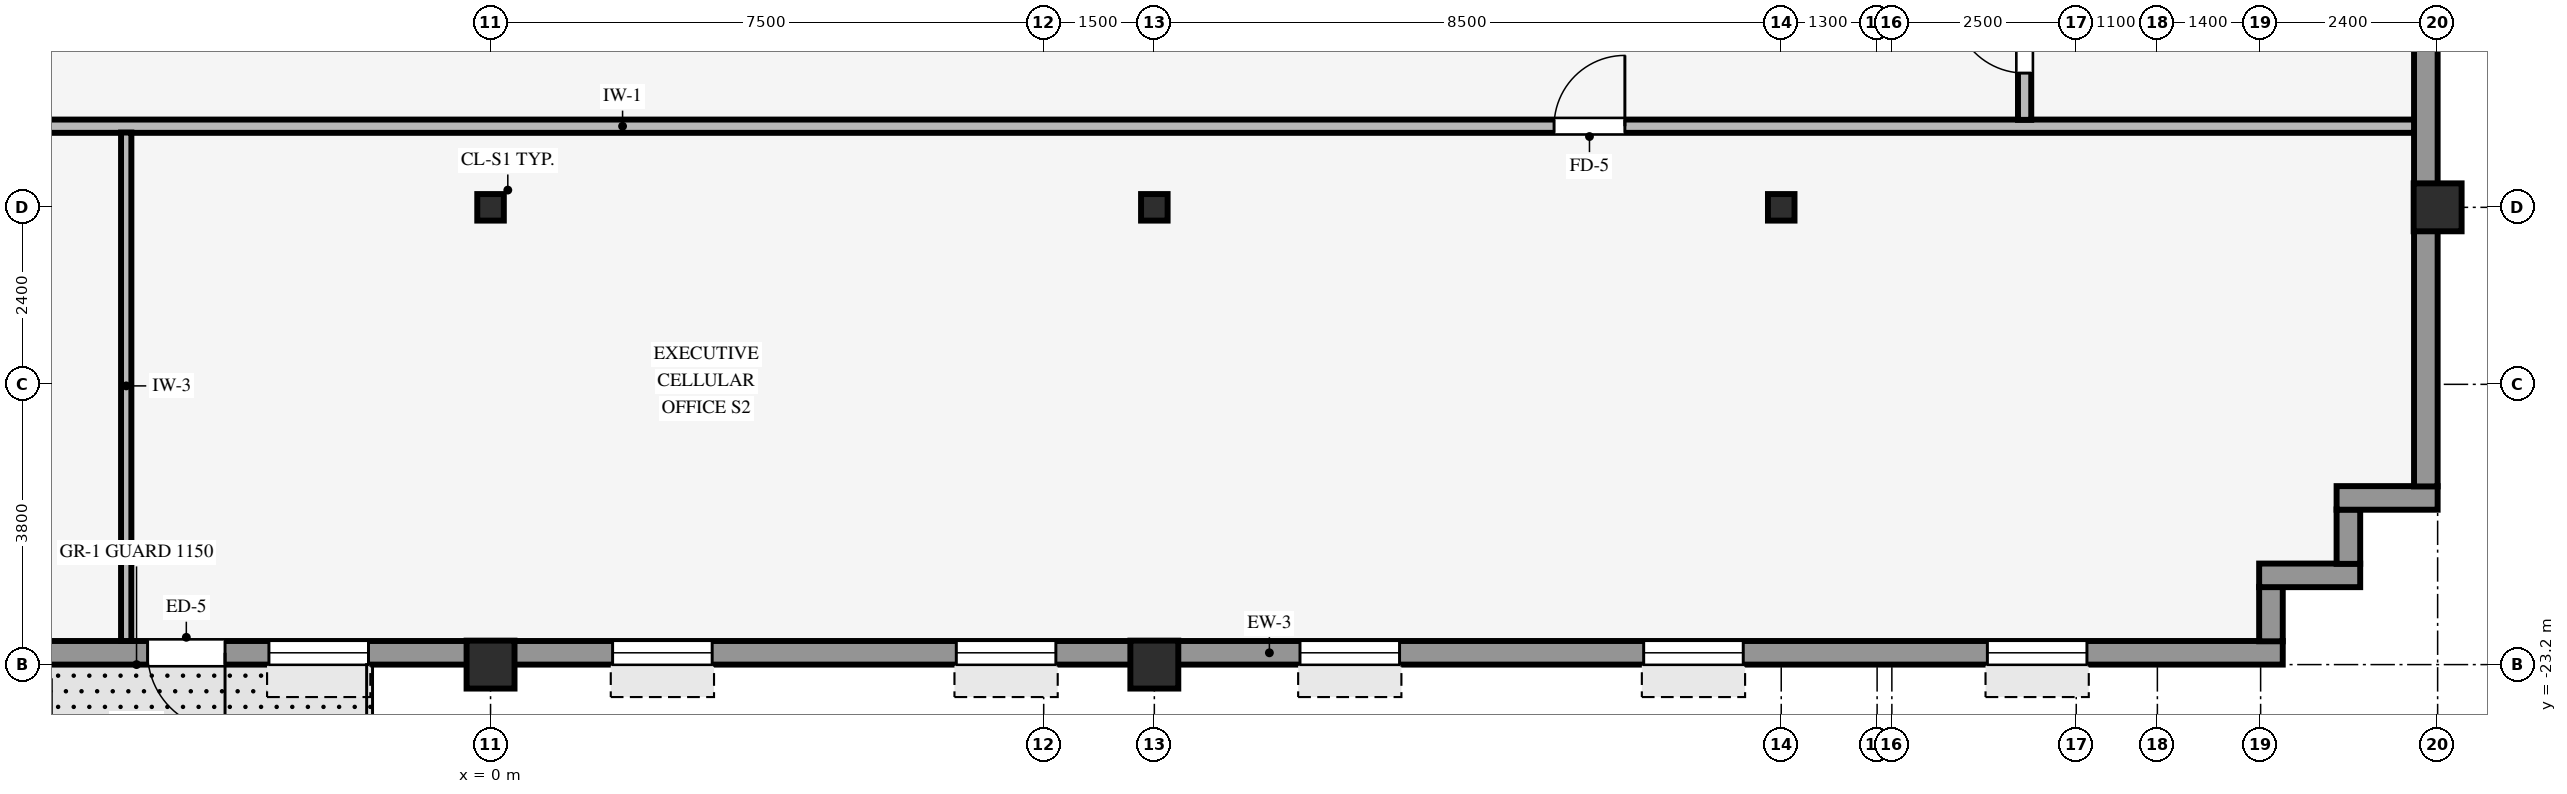
"""IFC4 building model, lengths in metres.
Left out: names, types, materials, properties, quantities, classifications, styles, units other than length and angle.
Written with IfcOpenShell. Run it as: python <this file> out.ifc"""

import sys

from ifc_helpers import new_model, si_unit, direction, frame, frame_2d, origin, origin_2d, place, context, subcontext, project, spatial, rectangle, hollow_rectangle, i_section, extrude, source, transform, mapped, element, fill, save


model = new_model("IFC4")
c1 = context("Model", 3, precision=1e-05, world=origin(), true_north=direction((0.0, 1.0)))
c2 = subcontext(c1, "Body", "Model", "MODEL_VIEW")
j1 = project(units=[si_unit("LENGTHUNIT", "METRE"), si_unit("PLANEANGLEUNIT", "RADIAN")], contexts=[c1])
p1 = place(None, origin())
s1 = spatial("IfcSite", under=j1, at=p1, CompositionType="ELEMENT")
p2 = place(p1, origin())
s2 = spatial("IfcBuilding", under=s1, at=p2, CompositionType="ELEMENT")
p3 = place(p2, frame((0.0, 0.0, 127.5)))
s3 = spatial("IfcBuildingStorey", under=s2, at=p3, CompositionType="ELEMENT", Elevation=127.5)
for number, where, z_axis, x_axis in (
    (1, (26.4, -17.0, 0.0), (0.0, 0.0, 1.0), (1.0, 0.0, 0.0)),
    (2, (0.0, -23.2, 0.0), (0.0, 0.0, 1.0), (1.0, 0.0, 0.0)),
    (3, (9.0, -23.2, 0.0), (0.0, 0.0, 1.0), (1.0, 0.0, 0.0)),
):
    element("IfcColumn", number, at=place(p3, frame(where, z_axis=z_axis, x_axis=x_axis)), inside=s3, PredefinedType="COLUMN", context=c2, shape_type="SweptSolid", body=[
        extrude(hollow_rectangle(XDim=0.65, YDim=0.65, WallThickness=0.04, InnerFilletRadius=0.04, OuterFilletRadius=0.08, at=origin_2d()), origin(), (0.0, 0.0, 1.0), 3.37),
    ])
for number, where, z_axis, x_axis in (
    (4, (0.0, -17.0, 0.0), (0.0, 0.0, 1.0), (1.0, 0.0, 0.0)),
    (5, (9.0, -17.0, 0.0), (0.0, 0.0, 1.0), (1.0, 0.0, 0.0)),
    (6, (17.5, -17.0, 0.0), (0.0, 0.0, 1.0), (1.0, 0.0, 0.0)),
):
    element("IfcColumn", number, at=place(p3, frame(where, z_axis=z_axis, x_axis=x_axis)), inside=s3, PredefinedType="COLUMN", context=c2, shape_type="SweptSolid", body=[
        extrude(i_section(OverallWidth=0.36, OverallDepth=0.36, WebThickness=0.021, FlangeThickness=0.021, FilletRadius=0.018, at=origin_2d()), origin(), (0.0, 0.0, 1.0), 3.37),
    ])
p4 = place(p3, frame((-24.3, -23.04, 0.0), z_axis=(0.0, 0.0, 1.0), x_axis=(1.0, 0.0, 0.0)))
e7 = element("IfcWall", 7, at=p4, inside=s3, PredefinedType="STANDARD", context=c2, shape_type="SweptSolid", body=[
    extrude(rectangle(XDim=48.6, YDim=0.32, at=frame_2d((24.3, 0.0))), origin(), (0.0, 0.0, 1.0), 2.705),
])
p5 = place(p4, frame((20.7, 0.0, 0.0), z_axis=(0.0, 0.0, 1.0), x_axis=(-1.0, 0.0, 0.0)))
e8 = element("IfcOpeningElement", 8, at=p5, cuts=e7, PredefinedType="OPENING", context=c2, shape_type="SweptSolid", body=[
    extrude(rectangle(XDim=1.05, YDim=2.1, at=frame_2d((0.525, 1.05))), frame((0.0, 0.17, 0.0), z_axis=(0.0, -1.0, 0.0), x_axis=(1.0, 0.0, 0.0)), (0.0, 0.0, 1.0), 0.34),
])
p6 = place(p4, frame((2.655, 0.0, 0.8)))
e9 = element("IfcOpeningElement", 9, at=p6, cuts=e7, PredefinedType="OPENING", context=c2, shape_type="SweptSolid", body=[
    extrude(rectangle(XDim=1.35, YDim=1.56, at=frame_2d((0.675, 0.78))), frame((0.0, 0.17, 0.0), z_axis=(0.0, -1.0, 0.0), x_axis=(1.0, 0.0, 0.0)), (0.0, 0.0, 1.0), 0.34),
])
p7 = place(p4, frame((7.315, 0.0, 0.8)))
e10 = element("IfcOpeningElement", 10, at=p7, cuts=e7, PredefinedType="OPENING", context=c2, shape_type="SweptSolid", body=[
    extrude(rectangle(XDim=1.35, YDim=1.56, at=frame_2d((0.675, 0.78))), frame((0.0, 0.17, 0.0), z_axis=(0.0, -1.0, 0.0), x_axis=(1.0, 0.0, 0.0)), (0.0, 0.0, 1.0), 0.34),
])
p8 = place(p4, frame((11.975, 0.0, 0.8)))
e11 = element("IfcOpeningElement", 11, at=p8, cuts=e7, PredefinedType="OPENING", context=c2, shape_type="SweptSolid", body=[
    extrude(rectangle(XDim=1.35, YDim=1.56, at=frame_2d((0.675, 0.78))), frame((0.0, 0.17, 0.0), z_axis=(0.0, -1.0, 0.0), x_axis=(1.0, 0.0, 0.0)), (0.0, 0.0, 1.0), 0.34),
])
p9 = place(p4, frame((16.635, 0.0, 0.8)))
e12 = element("IfcOpeningElement", 12, at=p9, cuts=e7, PredefinedType="OPENING", context=c2, shape_type="SweptSolid", body=[
    extrude(rectangle(XDim=1.35, YDim=1.56, at=frame_2d((0.675, 0.78))), frame((0.0, 0.17, 0.0), z_axis=(0.0, -1.0, 0.0), x_axis=(1.0, 0.0, 0.0)), (0.0, 0.0, 1.0), 0.34),
])
p10 = place(p4, frame((21.295, 0.0, 0.8)))
e13 = element("IfcOpeningElement", 13, at=p10, cuts=e7, PredefinedType="OPENING", context=c2, shape_type="SweptSolid", body=[
    extrude(rectangle(XDim=1.35, YDim=1.56, at=frame_2d((0.675, 0.78))), frame((0.0, 0.17, 0.0), z_axis=(0.0, -1.0, 0.0), x_axis=(1.0, 0.0, 0.0)), (0.0, 0.0, 1.0), 0.34),
])
p11 = place(p4, frame((25.955, 0.0, 0.8)))
e14 = element("IfcOpeningElement", 14, at=p11, cuts=e7, PredefinedType="OPENING", context=c2, shape_type="SweptSolid", body=[
    extrude(rectangle(XDim=1.35, YDim=1.56, at=frame_2d((0.675, 0.78))), frame((0.0, 0.17, 0.0), z_axis=(0.0, -1.0, 0.0), x_axis=(1.0, 0.0, 0.0)), (0.0, 0.0, 1.0), 0.34),
])
p12 = place(p4, frame((30.615, 0.0, 0.8)))
e15 = element("IfcOpeningElement", 15, at=p12, cuts=e7, PredefinedType="OPENING", context=c2, shape_type="SweptSolid", body=[
    extrude(rectangle(XDim=1.35, YDim=1.56, at=frame_2d((0.675, 0.78))), frame((0.0, 0.17, 0.0), z_axis=(0.0, -1.0, 0.0), x_axis=(1.0, 0.0, 0.0)), (0.0, 0.0, 1.0), 0.34),
])
p13 = place(p4, frame((35.275, 0.0, 0.8)))
e16 = element("IfcOpeningElement", 16, at=p13, cuts=e7, PredefinedType="OPENING", context=c2, shape_type="SweptSolid", body=[
    extrude(rectangle(XDim=1.35, YDim=1.56, at=frame_2d((0.675, 0.78))), frame((0.0, 0.17, 0.0), z_axis=(0.0, -1.0, 0.0), x_axis=(1.0, 0.0, 0.0)), (0.0, 0.0, 1.0), 0.34),
])
p14 = place(p4, frame((39.935, 0.0, 0.8)))
e17 = element("IfcOpeningElement", 17, at=p14, cuts=e7, PredefinedType="OPENING", context=c2, shape_type="SweptSolid", body=[
    extrude(rectangle(XDim=1.35, YDim=1.56, at=frame_2d((0.675, 0.78))), frame((0.0, 0.17, 0.0), z_axis=(0.0, -1.0, 0.0), x_axis=(1.0, 0.0, 0.0)), (0.0, 0.0, 1.0), 0.34),
])
p15 = place(p4, frame((44.595, 0.0, 0.8)))
e18 = element("IfcOpeningElement", 18, at=p15, cuts=e7, PredefinedType="OPENING", context=c2, shape_type="SweptSolid", body=[
    extrude(rectangle(XDim=1.35, YDim=1.56, at=frame_2d((0.675, 0.78))), frame((0.0, 0.17, 0.0), z_axis=(0.0, -1.0, 0.0), x_axis=(1.0, 0.0, 0.0)), (0.0, 0.0, 1.0), 0.34),
])
p16 = place(p3, frame((24.14, -22.884, 0.0), z_axis=(0.0, 0.0, 1.0), x_axis=(0.0, 1.0, 0.0)))
e19 = element("IfcWall", 19, at=p16, inside=s3, PredefinedType="STANDARD", context=c2, shape_type="SweptSolid", body=[
    extrude(rectangle(XDim=0.738, YDim=0.32, at=frame_2d((0.369, 0.0))), origin(), (0.0, 0.0, 1.0), 3.36),
])
p17 = place(p3, frame((23.98, -21.99, 0.0), z_axis=(0.0, 0.0, 1.0), x_axis=(1.0, 0.0, 0.0)))
e20 = element("IfcWall", 20, at=p17, inside=s3, PredefinedType="STANDARD", context=c2, shape_type="SweptSolid", body=[
    extrude(rectangle(XDim=1.37, YDim=0.32, at=frame_2d((0.685, 0.0))), origin(), (0.0, 0.0, 1.0), 3.36),
])
p18 = place(p3, frame((25.19, -21.834, 0.0), z_axis=(0.0, 0.0, 1.0), x_axis=(0.0, 1.0, 0.0)))
e21 = element("IfcWall", 21, at=p18, inside=s3, PredefinedType="STANDARD", context=c2, shape_type="SweptSolid", body=[
    extrude(rectangle(XDim=0.738, YDim=0.32, at=frame_2d((0.369, 0.0))), origin(), (0.0, 0.0, 1.0), 3.36),
])
p19 = place(p3, frame((25.03, -20.94, 0.0), z_axis=(0.0, 0.0, 1.0), x_axis=(1.0, 0.0, 0.0)))
e22 = element("IfcWall", 22, at=p19, inside=s3, PredefinedType="STANDARD", context=c2, shape_type="SweptSolid", body=[
    extrude(rectangle(XDim=1.37, YDim=0.32, at=frame_2d((0.685, 0.0))), origin(), (0.0, 0.0, 1.0), 3.36),
])
p20 = place(p3, frame((26.24, -20.784, 0.0), z_axis=(0.0, 0.0, 1.0), x_axis=(0.0, 1.0, 0.0)))
e23 = element("IfcWall", 23, at=p20, inside=s3, PredefinedType="STANDARD", context=c2, shape_type="SweptSolid", body=[
    extrude(rectangle(XDim=41.568, YDim=0.32, at=frame_2d((20.784, 0.0))), origin(), (0.0, 0.0, 1.0), 2.705),
])
p21 = place(p20, frame((7.369, 0.0, 0.8)))
e24 = element("IfcOpeningElement", 24, at=p21, cuts=e23, PredefinedType="OPENING", context=c2, shape_type="SweptSolid", body=[
    extrude(rectangle(XDim=2.1, YDim=1.56, at=frame_2d((1.05, 0.78))), frame((0.0, 0.17, 0.0), z_axis=(0.0, -1.0, 0.0), x_axis=(1.0, 0.0, 0.0)), (0.0, 0.0, 1.0), 0.34),
])
p22 = place(p20, frame((12.315, 0.0, 0.8)))
e25 = element("IfcOpeningElement", 25, at=p22, cuts=e23, PredefinedType="OPENING", context=c2, shape_type="SweptSolid", body=[
    extrude(rectangle(XDim=2.1, YDim=1.56, at=frame_2d((1.05, 0.78))), frame((0.0, 0.17, 0.0), z_axis=(0.0, -1.0, 0.0), x_axis=(1.0, 0.0, 0.0)), (0.0, 0.0, 1.0), 0.34),
])
p23 = place(p20, frame((17.711, 0.0, 0.8)))
e26 = element("IfcOpeningElement", 26, at=p23, cuts=e23, PredefinedType="OPENING", context=c2, shape_type="SweptSolid", body=[
    extrude(rectangle(XDim=2.1, YDim=1.56, at=frame_2d((1.05, 0.78))), frame((0.0, 0.17, 0.0), z_axis=(0.0, -1.0, 0.0), x_axis=(1.0, 0.0, 0.0)), (0.0, 0.0, 1.0), 0.34),
])
p24 = place(p20, frame((22.207, 0.0, 0.8)))
e27 = element("IfcOpeningElement", 27, at=p24, cuts=e23, PredefinedType="OPENING", context=c2, shape_type="SweptSolid", body=[
    extrude(rectangle(XDim=2.1, YDim=1.56, at=frame_2d((1.05, 0.78))), frame((0.0, 0.17, 0.0), z_axis=(0.0, -1.0, 0.0), x_axis=(1.0, 0.0, 0.0)), (0.0, 0.0, 1.0), 0.34),
])
p25 = place(p20, frame((27.153, 0.0, 0.8)))
e28 = element("IfcOpeningElement", 28, at=p25, cuts=e23, PredefinedType="OPENING", context=c2, shape_type="SweptSolid", body=[
    extrude(rectangle(XDim=2.1, YDim=1.56, at=frame_2d((1.05, 0.78))), frame((0.0, 0.17, 0.0), z_axis=(0.0, -1.0, 0.0), x_axis=(1.0, 0.0, 0.0)), (0.0, 0.0, 1.0), 0.34),
])
p26 = place(p20, frame((32.099, 0.0, 0.8)))
e29 = element("IfcOpeningElement", 29, at=p26, cuts=e23, PredefinedType="OPENING", context=c2, shape_type="SweptSolid", body=[
    extrude(rectangle(XDim=2.1, YDim=1.56, at=frame_2d((1.05, 0.78))), frame((0.0, 0.17, 0.0), z_axis=(0.0, -1.0, 0.0), x_axis=(1.0, 0.0, 0.0)), (0.0, 0.0, 1.0), 0.34),
])
p27 = place(p3, frame((-26.08, -15.9, 0.0), z_axis=(0.0, 0.0, 1.0), x_axis=(1.0, 0.0, 0.0)))
e30 = element("IfcWall", 30, at=p27, inside=s3, PredefinedType="PARTITIONING", context=c2, shape_type="SweptSolid", body=[
    extrude(rectangle(XDim=52.16, YDim=0.18, at=frame_2d((26.08, 0.0))), origin(), (0.0, 0.0, 1.0), 3.36),
])
p28 = place(p27, frame((14.28, 0.0, 0.0)))
e31 = element("IfcOpeningElement", 31, at=p28, cuts=e30, PredefinedType="OPENING", context=c2, shape_type="SweptSolid", body=[
    extrude(rectangle(XDim=0.96, YDim=2.1, at=frame_2d((0.48, 1.05))), frame((0.0, 0.1, 0.0), z_axis=(0.0, -1.0, 0.0), x_axis=(1.0, 0.0, 0.0)), (0.0, 0.0, 1.0), 0.2),
])
p29 = place(p27, frame((40.5, 0.0, 0.0)))
e32 = element("IfcOpeningElement", 32, at=p29, cuts=e30, PredefinedType="OPENING", context=c2, shape_type="SweptSolid", body=[
    extrude(rectangle(XDim=0.96, YDim=2.1, at=frame_2d((0.48, 1.05))), frame((0.0, 0.1, 0.0), z_axis=(0.0, -1.0, 0.0), x_axis=(1.0, 0.0, 0.0)), (0.0, 0.0, 1.0), 0.2),
])
p30 = place(p3, frame((-4.94, -22.88, 0.0), z_axis=(0.0, 0.0, 1.0), x_axis=(0.0, 1.0, 0.0)))
e33 = element("IfcWall", 33, at=p30, inside=s3, PredefinedType="PARTITIONING", context=c2, shape_type="SweptSolid", body=[
    extrude(rectangle(XDim=6.894, YDim=0.14, at=frame_2d((3.447, 0.0))), origin(), (0.0, 0.0, 1.0), 3.36),
])
p31 = place(p3, frame((20.8, -15.814, 0.0), z_axis=(0.0, 0.0, 1.0), x_axis=(0.0, 1.0, 0.0)))
e34 = element("IfcWall", 34, at=p31, inside=s3, PredefinedType="PARTITIONING", context=c2, shape_type="SweptSolid", body=[
    extrude(rectangle(XDim=2.228, YDim=0.18, at=frame_2d((1.114, 0.0))), origin(), (0.0, 0.0, 1.0), 3.36),
])
p32 = place(p31, frame((0.634, 0.0, 0.0)))
e35 = element("IfcOpeningElement", 35, at=p32, cuts=e34, PredefinedType="OPENING", context=c2, shape_type="SweptSolid", body=[
    extrude(rectangle(XDim=0.96, YDim=2.1, at=frame_2d((0.48, 1.05))), frame((0.0, 0.1, 0.0), z_axis=(0.0, -1.0, 0.0), x_axis=(1.0, 0.0, 0.0)), (0.0, 0.0, 1.0), 0.2),
])
m1 = source(origin(), c2, "Body", "SweptSolid", [
    extrude(rectangle(XDim=1.05, YDim=2.1, at=frame_2d((0.525, 1.05))), frame((0.0, 0.025, 0.0), z_axis=(0.0, -1.0, 0.0), x_axis=(1.0, 0.0, 0.0)), (0.0, 0.0, 1.0), 0.05),
])
p33 = place(p5, origin())
e36 = element("IfcDoor", 36, at=p33, inside=s3, OperationType="SINGLE_SWING_LEFT", PredefinedType="DOOR", context=c2, shape_type="MappedRepresentation", body=[
    mapped(m1, transform((0.0, 0.0, 0.0), scale=1.0)),
])
fill(e8, e36)
m2 = source(origin(), c2, "Body", "SweptSolid", [
    extrude(rectangle(XDim=1.35, YDim=1.56, at=frame_2d((0.675, 0.78))), frame((0.0, 0.03, 0.0), z_axis=(0.0, -1.0, 0.0), x_axis=(1.0, 0.0, 0.0)), (0.0, 0.0, 1.0), 0.06),
])
p34 = place(p10, origin())
e37 = element("IfcWindow", 37, at=p34, inside=s3, PartitioningType="SINGLE_PANEL", PredefinedType="WINDOW", context=c2, shape_type="MappedRepresentation", body=[
    mapped(m2, transform((0.0, 0.0, 0.0), scale=1.0)),
])
fill(e13, e37)
p35 = place(p11, origin())
e38 = element("IfcWindow", 38, at=p35, inside=s3, PartitioningType="SINGLE_PANEL", PredefinedType="WINDOW", context=c2, shape_type="MappedRepresentation", body=[
    mapped(m2, transform((0.0, 0.0, 0.0), scale=1.0)),
])
fill(e14, e38)
p36 = place(p12, origin())
e39 = element("IfcWindow", 39, at=p36, inside=s3, PartitioningType="SINGLE_PANEL", PredefinedType="WINDOW", context=c2, shape_type="MappedRepresentation", body=[
    mapped(m2, transform((0.0, 0.0, 0.0), scale=1.0)),
])
fill(e15, e39)
p37 = place(p13, origin())
e40 = element("IfcWindow", 40, at=p37, inside=s3, PartitioningType="SINGLE_PANEL", PredefinedType="WINDOW", context=c2, shape_type="MappedRepresentation", body=[
    mapped(m2, transform((0.0, 0.0, 0.0), scale=1.0)),
])
fill(e16, e40)
p38 = place(p14, origin())
e41 = element("IfcWindow", 41, at=p38, inside=s3, PartitioningType="SINGLE_PANEL", PredefinedType="WINDOW", context=c2, shape_type="MappedRepresentation", body=[
    mapped(m2, transform((0.0, 0.0, 0.0), scale=1.0)),
])
fill(e17, e41)
p39 = place(p15, origin())
e42 = element("IfcWindow", 42, at=p39, inside=s3, PartitioningType="SINGLE_PANEL", PredefinedType="WINDOW", context=c2, shape_type="MappedRepresentation", body=[
    mapped(m2, transform((0.0, 0.0, 0.0), scale=1.0)),
])
fill(e18, e42)
m3 = source(origin(), c2, "Body", "SweptSolid", [
    extrude(rectangle(XDim=0.96, YDim=2.1, at=frame_2d((0.48, 1.05))), frame((0.0, 0.025, 0.0), z_axis=(0.0, -1.0, 0.0), x_axis=(1.0, 0.0, 0.0)), (0.0, 0.0, 1.0), 0.05),
])
p40 = place(p29, origin())
e43 = element("IfcDoor", 43, at=p40, inside=s3, OperationType="SINGLE_SWING_RIGHT", PredefinedType="DOOR", context=c2, shape_type="MappedRepresentation", body=[
    mapped(m3, transform((0.0, 0.0, 0.0), scale=1.0)),
])
fill(e32, e43)
p41 = place(p32, origin())
e44 = element("IfcDoor", 44, at=p41, inside=s3, OperationType="SINGLE_SWING_RIGHT", PredefinedType="DOOR", context=c2, shape_type="MappedRepresentation", body=[
    mapped(m3, transform((0.0, 0.0, 0.0), scale=1.0)),
])
fill(e35, e44)
save(model, sys.argv[1])
